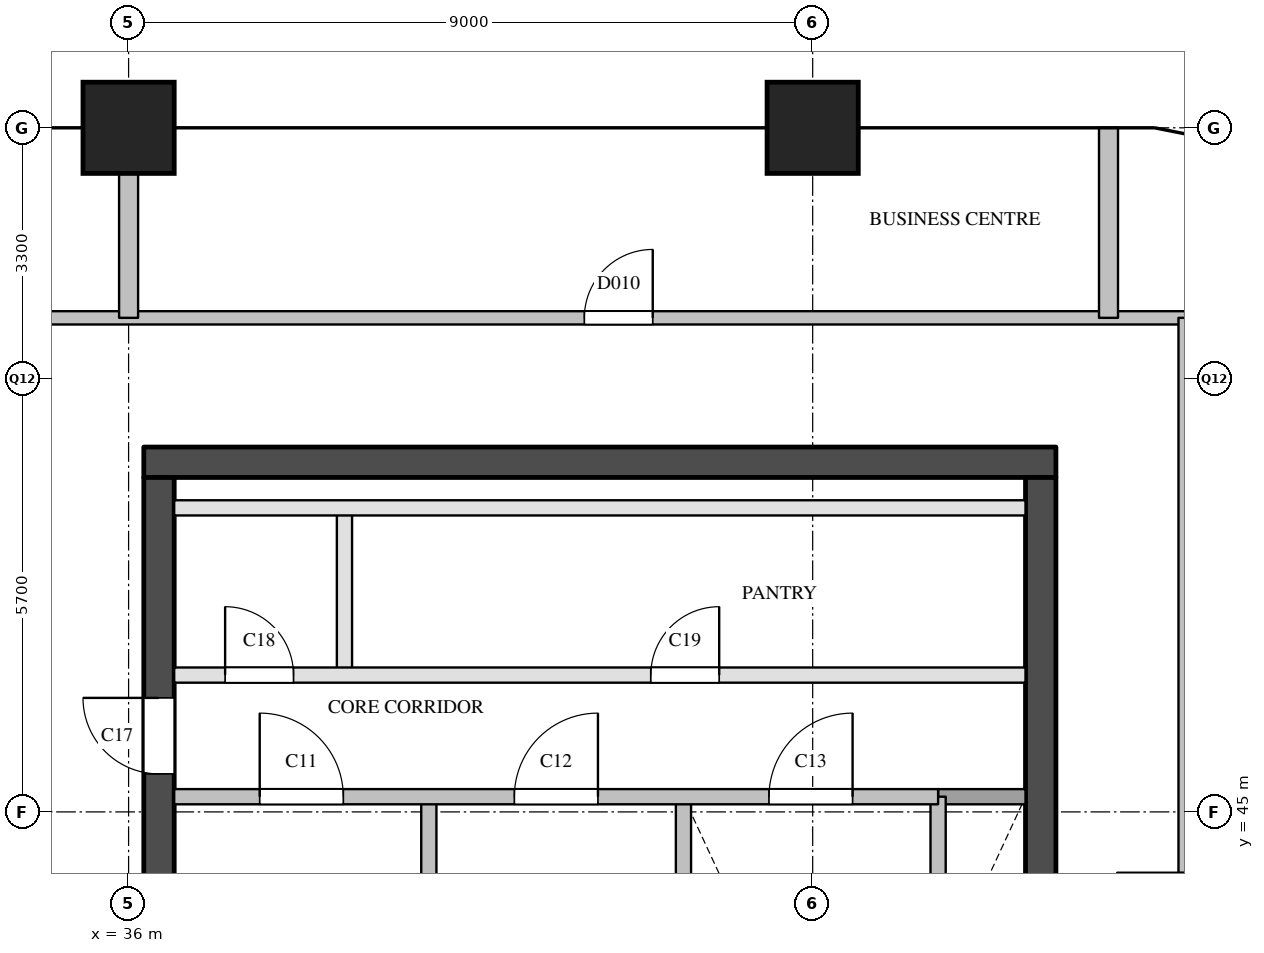
"""IFC4 building model, lengths in metres.
Left out: names, types, materials, properties, quantities, classifications, styles, units other than length and angle.
Written with IfcOpenShell. Run it as: python <this file> out.ifc"""

import sys

from ifc_helpers import new_model, si_unit, direction, frame, frame_2d, origin, origin_2d, place, context, subcontext, project, spatial, rectangle, extrude, element, fill, save


model = new_model("IFC4")
c1 = context("Model", 3, precision=1e-05, world=origin(), true_north=direction((0.0, 1.0)))
c2 = subcontext(c1, "Body", "Model", "MODEL_VIEW")
j1 = project(units=[si_unit("LENGTHUNIT", "METRE"), si_unit("PLANEANGLEUNIT", "RADIAN")], contexts=[c1])
p1 = place(None, origin())
s1 = spatial("IfcSite", under=j1, at=p1, CompositionType="ELEMENT")
p2 = place(p1, origin())
s2 = spatial("IfcBuilding", under=s1, at=p2, CompositionType="ELEMENT")
p3 = place(p2, frame((0.0, 0.0, 211.1)))
s3 = spatial("IfcBuildingStorey", under=s2, at=p3, CompositionType="ELEMENT", Elevation=211.1)
for number, where, z_axis, x_axis in (
    (1, (36.0, 54.0, 0.0), (0.0, 0.0, 1.0), (1.0, 0.0, 0.0)),
    (2, (45.0, 54.0, 0.0), (0.0, 0.0, 1.0), (1.0, 0.0, 0.0)),
):
    element("IfcColumn", number, at=place(p3, frame(where, z_axis=z_axis, x_axis=x_axis)), inside=s3, PredefinedType="COLUMN", context=c2, shape_type="SweptSolid", body=[
        extrude(rectangle(XDim=1.2, YDim=1.2, at=origin_2d()), origin(), (0.0, 0.0, 1.0), 3.9),
    ])
p4 = place(p3, frame((36.2, 49.6, 0.0), z_axis=(0.0, 0.0, 1.0), x_axis=(1.0, 0.0, 0.0)))
e3 = element("IfcWall", 3, at=p4, inside=s3, PredefinedType="SHEAR", context=c2, shape_type="SweptSolid", body=[
    extrude(rectangle(XDim=12.0, YDim=0.4, at=frame_2d((6.0, 0.0))), origin(), (0.0, 0.0, 1.0), 3.6),
])
p5 = place(p3, frame((36.4, 29.1, 0.0), z_axis=(0.0, 0.0, 1.0), x_axis=(0.0, 1.0, 0.0)))
e4 = element("IfcWall", 4, at=p5, inside=s3, PredefinedType="SHEAR", context=c2, shape_type="SweptSolid", body=[
    extrude(rectangle(XDim=20.3, YDim=0.4, at=frame_2d((10.15, 0.0))), origin(), (0.0, 0.0, 1.0), 3.6),
])
p6 = place(p5, frame((3.6, 0.0, 0.0)))
e5 = element("IfcOpeningElement", 5, at=p6, cuts=e4, PredefinedType="OPENING", context=c2, shape_type="SweptSolid", body=[
    extrude(rectangle(XDim=1.8, YDim=2.1, at=frame_2d((0.9, 1.05))), frame((0.0, 0.21, 0.0), z_axis=(0.0, -1.0, 0.0), x_axis=(1.0, 0.0, 0.0)), (0.0, 0.0, 1.0), 0.42),
])
p7 = place(p5, frame((16.4, 0.0, 0.0)))
e6 = element("IfcOpeningElement", 6, at=p7, cuts=e4, PredefinedType="OPENING", context=c2, shape_type="SweptSolid", body=[
    extrude(rectangle(XDim=1.0, YDim=2.1, at=frame_2d((0.5, 1.05))), frame((0.0, 0.21, 0.0), z_axis=(0.0, -1.0, 0.0), x_axis=(1.0, 0.0, 0.0)), (0.0, 0.0, 1.0), 0.42),
])
p8 = place(p3, frame((48.0, 29.1, 0.0), z_axis=(0.0, 0.0, 1.0), x_axis=(0.0, 1.0, 0.0)))
e7 = element("IfcWall", 7, at=p8, inside=s3, PredefinedType="SHEAR", context=c2, shape_type="SweptSolid", body=[
    extrude(rectangle(XDim=20.3, YDim=0.4, at=frame_2d((10.15, 0.0))), origin(), (0.0, 0.0, 1.0), 3.6),
])
p9 = place(p8, frame((12.5, 0.0, 0.0)))
e8 = element("IfcOpeningElement", 8, at=p9, cuts=e7, PredefinedType="OPENING", context=c2, shape_type="SweptSolid", body=[
    extrude(rectangle(XDim=0.7, YDim=2.1, at=frame_2d((0.35, 1.05))), frame((0.0, 0.21, 0.0), z_axis=(0.0, -1.0, 0.0), x_axis=(1.0, 0.0, 0.0)), (0.0, 0.0, 1.0), 0.42),
])
p10 = place(p8, frame((3.9, 0.0, 0.0)))
e9 = element("IfcOpeningElement", 9, at=p10, cuts=e7, PredefinedType="OPENING", context=c2, shape_type="SweptSolid", body=[
    extrude(rectangle(XDim=1.8, YDim=2.1, at=frame_2d((0.9, 1.05))), frame((0.0, 0.21, 0.0), z_axis=(0.0, -1.0, 0.0), x_axis=(1.0, 0.0, 0.0)), (0.0, 0.0, 1.0), 0.42),
])
p11 = place(p3, frame((38.84, 46.8, 0.0), z_axis=(0.0, 0.0, 1.0), x_axis=(0.0, 1.0, 0.0)))
e10 = element("IfcWall", 10, at=p11, inside=s3, PredefinedType="PARTITIONING", context=c2, shape_type="SweptSolid", body=[
    extrude(rectangle(XDim=2.2, YDim=0.2, at=frame_2d((1.1, 0.0))), origin(), (0.0, 0.0, 1.0), 3.6),
])
for number, where, z_axis, x_axis in (
    (11, (39.95, 40.78, 0.0), (0.0, 0.0, 1.0), (0.0, 1.0, 0.0)),
    (12, (43.3, 40.78, 0.0), (0.0, 0.0, 1.0), (0.0, 1.0, 0.0)),
    (13, (46.65, 40.78, 0.0), (0.0, 0.0, 1.0), (0.0, 1.0, 0.0)),
):
    element("IfcWall", number, at=place(p3, frame(where, z_axis=z_axis, x_axis=x_axis)), inside=s3, PredefinedType="SOLIDWALL", context=c2, shape_type="SweptSolid", body=[
        extrude(rectangle(XDim=4.42, YDim=0.2, at=frame_2d((2.21, 0.0))), origin(), (0.0, 0.0, 1.0), 3.6),
    ])
p12 = place(p3, frame((46.65, 45.2, 0.0), z_axis=(0.0, 0.0, 1.0), x_axis=(1.0, 0.0, 0.0)))
e14 = element("IfcWall", 14, at=p12, inside=s3, PredefinedType="SOLIDWALL", context=c2, shape_type="SweptSolid", body=[
    extrude(rectangle(XDim=1.15, YDim=0.2, at=frame_2d((0.575, 0.0))), origin(), (0.0, 0.0, 1.0), 3.6),
])
p13 = place(p3, frame((36.6, 45.2, 0.0), z_axis=(0.0, 0.0, 1.0), x_axis=(1.0, 0.0, 0.0)))
e15 = element("IfcWall", 15, at=p13, inside=s3, PredefinedType="SOLIDWALL", context=c2, shape_type="SweptSolid", body=[
    extrude(rectangle(XDim=10.05, YDim=0.2, at=frame_2d((5.025, 0.0))), origin(), (0.0, 0.0, 1.0), 3.6),
])
p14 = place(p13, frame((1.125, 0.0, 0.0)))
e16 = element("IfcOpeningElement", 16, at=p14, cuts=e15, PredefinedType="OPENING", context=c2, shape_type="SweptSolid", body=[
    extrude(rectangle(XDim=1.1, YDim=2.1, at=frame_2d((0.55, 1.05))), frame((0.0, 0.11, 0.0), z_axis=(0.0, -1.0, 0.0), x_axis=(1.0, 0.0, 0.0)), (0.0, 0.0, 1.0), 0.22),
])
p15 = place(p13, frame((4.475, 0.0, 0.0)))
e17 = element("IfcOpeningElement", 17, at=p15, cuts=e15, PredefinedType="OPENING", context=c2, shape_type="SweptSolid", body=[
    extrude(rectangle(XDim=1.1, YDim=2.1, at=frame_2d((0.55, 1.05))), frame((0.0, 0.11, 0.0), z_axis=(0.0, -1.0, 0.0), x_axis=(1.0, 0.0, 0.0)), (0.0, 0.0, 1.0), 0.22),
])
p16 = place(p13, frame((7.825, 0.0, 0.0)))
e18 = element("IfcOpeningElement", 18, at=p16, cuts=e15, PredefinedType="OPENING", context=c2, shape_type="SweptSolid", body=[
    extrude(rectangle(XDim=1.1, YDim=2.1, at=frame_2d((0.55, 1.05))), frame((0.0, 0.11, 0.0), z_axis=(0.0, -1.0, 0.0), x_axis=(1.0, 0.0, 0.0)), (0.0, 0.0, 1.0), 0.22),
])
p17 = place(p3, frame((36.6, 46.8, 0.0), z_axis=(0.0, 0.0, 1.0), x_axis=(1.0, 0.0, 0.0)))
e19 = element("IfcWall", 19, at=p17, inside=s3, PredefinedType="PARTITIONING", context=c2, shape_type="SweptSolid", body=[
    extrude(rectangle(XDim=11.2, YDim=0.2, at=frame_2d((5.6, 0.0))), origin(), (0.0, 0.0, 1.0), 3.6),
])
p18 = place(p17, frame((0.67, 0.0, 0.0)))
e20 = element("IfcOpeningElement", 20, at=p18, cuts=e19, PredefinedType="OPENING", context=c2, shape_type="SweptSolid", body=[
    extrude(rectangle(XDim=0.9, YDim=2.1, at=frame_2d((0.45, 1.05))), frame((0.0, 0.11, 0.0), z_axis=(0.0, -1.0, 0.0), x_axis=(1.0, 0.0, 0.0)), (0.0, 0.0, 1.0), 0.22),
])
p19 = place(p17, frame((6.27, 0.0, 0.0)))
e21 = element("IfcOpeningElement", 21, at=p19, cuts=e19, PredefinedType="OPENING", context=c2, shape_type="SweptSolid", body=[
    extrude(rectangle(XDim=0.9, YDim=2.1, at=frame_2d((0.45, 1.05))), frame((0.0, 0.11, 0.0), z_axis=(0.0, -1.0, 0.0), x_axis=(1.0, 0.0, 0.0)), (0.0, 0.0, 1.0), 0.22),
])
p20 = place(p3, frame((36.6, 49.0, 0.0), z_axis=(0.0, 0.0, 1.0), x_axis=(1.0, 0.0, 0.0)))
e22 = element("IfcWall", 22, at=p20, inside=s3, PredefinedType="PARTITIONING", context=c2, shape_type="SweptSolid", body=[
    extrude(rectangle(XDim=11.2, YDim=0.2, at=frame_2d((5.6, 0.0))), origin(), (0.0, 0.0, 1.0), 3.6),
])
p21 = place(p3, frame((34.5, 51.5, 0.0), z_axis=(0.0, 0.0, 1.0), x_axis=(1.0, 0.0, 0.0)))
e23 = element("IfcWall", 23, at=p21, inside=s3, PredefinedType="PARTITIONING", context=c2, shape_type="SweptSolid", body=[
    extrude(rectangle(XDim=15.4, YDim=0.175, at=frame_2d((7.7, 0.0))), origin(), (0.0, 0.0, 1.0), 3.6),
])
p22 = place(p21, frame((7.496, 0.0, 0.0)))
e24 = element("IfcOpeningElement", 24, at=p22, cuts=e23, PredefinedType="OPENING", context=c2, shape_type="SweptSolid", body=[
    extrude(rectangle(XDim=0.9, YDim=2.1, at=frame_2d((0.45, 1.05))), frame((0.0, 0.097, 0.0), z_axis=(0.0, -1.0, 0.0), x_axis=(1.0, 0.0, 0.0)), (0.0, 0.0, 1.0), 0.195),
])
p23 = place(p3, frame((49.9, 28.5, 0.0), z_axis=(0.0, 0.0, 1.0), x_axis=(0.0, 1.0, 0.0)))
e25 = element("IfcWall", 25, at=p23, inside=s3, PredefinedType="PARTITIONING", context=c2, shape_type="SweptSolid", body=[
    extrude(rectangle(XDim=23.0, YDim=0.175, at=frame_2d((11.5, 0.0))), origin(), (0.0, 0.0, 1.0), 3.6),
])
p24 = place(p23, frame((14.8, 0.0, 0.0)))
e26 = element("IfcOpeningElement", 26, at=p24, cuts=e25, PredefinedType="OPENING", context=c2, shape_type="SweptSolid", body=[
    extrude(rectangle(XDim=0.9, YDim=2.1, at=frame_2d((0.45, 1.05))), frame((0.0, 0.097, 0.0), z_axis=(0.0, -1.0, 0.0), x_axis=(1.0, 0.0, 0.0)), (0.0, 0.0, 1.0), 0.195),
])
p25 = place(p3, frame((36.0, 51.5, 0.0), z_axis=(0.0, 0.0, 1.0), x_axis=(0.0, 1.0, 0.0)))
e27 = element("IfcWall", 27, at=p25, inside=s3, PredefinedType="PARTITIONING", context=c2, shape_type="SweptSolid", body=[
    extrude(rectangle(XDim=2.5, YDim=0.25, at=frame_2d((1.25, 0.0))), origin(), (0.0, 0.0, 1.0), 3.6),
])
p26 = place(p3, frame((48.892, 51.5, 0.0), z_axis=(0.0, 0.0, 1.0), x_axis=(0.0, 1.0, 0.0)))
e28 = element("IfcWall", 28, at=p26, inside=s3, PredefinedType="PARTITIONING", context=c2, shape_type="SweptSolid", body=[
    extrude(rectangle(XDim=2.5, YDim=0.25, at=frame_2d((1.25, 0.0))), origin(), (0.0, 0.0, 1.0), 2.6),
])
p27 = place(p14, origin())
e29 = element("IfcDoor", 29, at=p27, inside=s3, OperationType="SINGLE_SWING_LEFT", PredefinedType="DOOR", context=c2, shape_type="SweptSolid", body=[
    extrude(rectangle(XDim=1.1, YDim=2.1, at=frame_2d((0.55, 1.05))), frame((0.0, 0.025, 0.0), z_axis=(0.0, -1.0, 0.0), x_axis=(1.0, 0.0, 0.0)), (0.0, 0.0, 1.0), 0.05),
])
fill(e16, e29)
p28 = place(p15, origin())
e30 = element("IfcDoor", 30, at=p28, inside=s3, OperationType="SINGLE_SWING_RIGHT", PredefinedType="DOOR", context=c2, shape_type="SweptSolid", body=[
    extrude(rectangle(XDim=1.1, YDim=2.1, at=frame_2d((0.55, 1.05))), frame((0.0, 0.025, 0.0), z_axis=(0.0, -1.0, 0.0), x_axis=(1.0, 0.0, 0.0)), (0.0, 0.0, 1.0), 0.05),
])
fill(e17, e30)
p29 = place(p16, origin())
e31 = element("IfcDoor", 31, at=p29, inside=s3, OperationType="SINGLE_SWING_RIGHT", PredefinedType="DOOR", context=c2, shape_type="SweptSolid", body=[
    extrude(rectangle(XDim=1.1, YDim=2.1, at=frame_2d((0.55, 1.05))), frame((0.0, 0.025, 0.0), z_axis=(0.0, -1.0, 0.0), x_axis=(1.0, 0.0, 0.0)), (0.0, 0.0, 1.0), 0.05),
])
fill(e18, e31)
p30 = place(p7, origin())
e32 = element("IfcDoor", 32, at=p30, inside=s3, OperationType="SINGLE_SWING_RIGHT", PredefinedType="DOOR", context=c2, shape_type="SweptSolid", body=[
    extrude(rectangle(XDim=1.0, YDim=2.1, at=frame_2d((0.5, 1.05))), frame((0.0, 0.025, 0.0), z_axis=(0.0, -1.0, 0.0), x_axis=(1.0, 0.0, 0.0)), (0.0, 0.0, 1.0), 0.05),
])
fill(e6, e32)
p31 = place(p18, origin())
e33 = element("IfcDoor", 33, at=p31, inside=s3, OperationType="SINGLE_SWING_LEFT", PredefinedType="DOOR", context=c2, shape_type="SweptSolid", body=[
    extrude(rectangle(XDim=0.9, YDim=2.1, at=frame_2d((0.45, 1.05))), frame((0.0, 0.025, 0.0), z_axis=(0.0, -1.0, 0.0), x_axis=(1.0, 0.0, 0.0)), (0.0, 0.0, 1.0), 0.05),
])
fill(e20, e33)
p32 = place(p19, origin())
e34 = element("IfcDoor", 34, at=p32, inside=s3, OperationType="SINGLE_SWING_RIGHT", PredefinedType="DOOR", context=c2, shape_type="SweptSolid", body=[
    extrude(rectangle(XDim=0.9, YDim=2.1, at=frame_2d((0.45, 1.05))), frame((0.0, 0.025, 0.0), z_axis=(0.0, -1.0, 0.0), x_axis=(1.0, 0.0, 0.0)), (0.0, 0.0, 1.0), 0.05),
])
fill(e21, e34)
p33 = place(p22, origin())
e35 = element("IfcDoor", 35, at=p33, inside=s3, OperationType="SINGLE_SWING_RIGHT", PredefinedType="DOOR", context=c2, shape_type="SweptSolid", body=[
    extrude(rectangle(XDim=0.9, YDim=2.1, at=frame_2d((0.45, 1.05))), frame((0.0, 0.025, 0.0), z_axis=(0.0, -1.0, 0.0), x_axis=(1.0, 0.0, 0.0)), (0.0, 0.0, 1.0), 0.05),
])
fill(e24, e35)
save(model, sys.argv[1])
